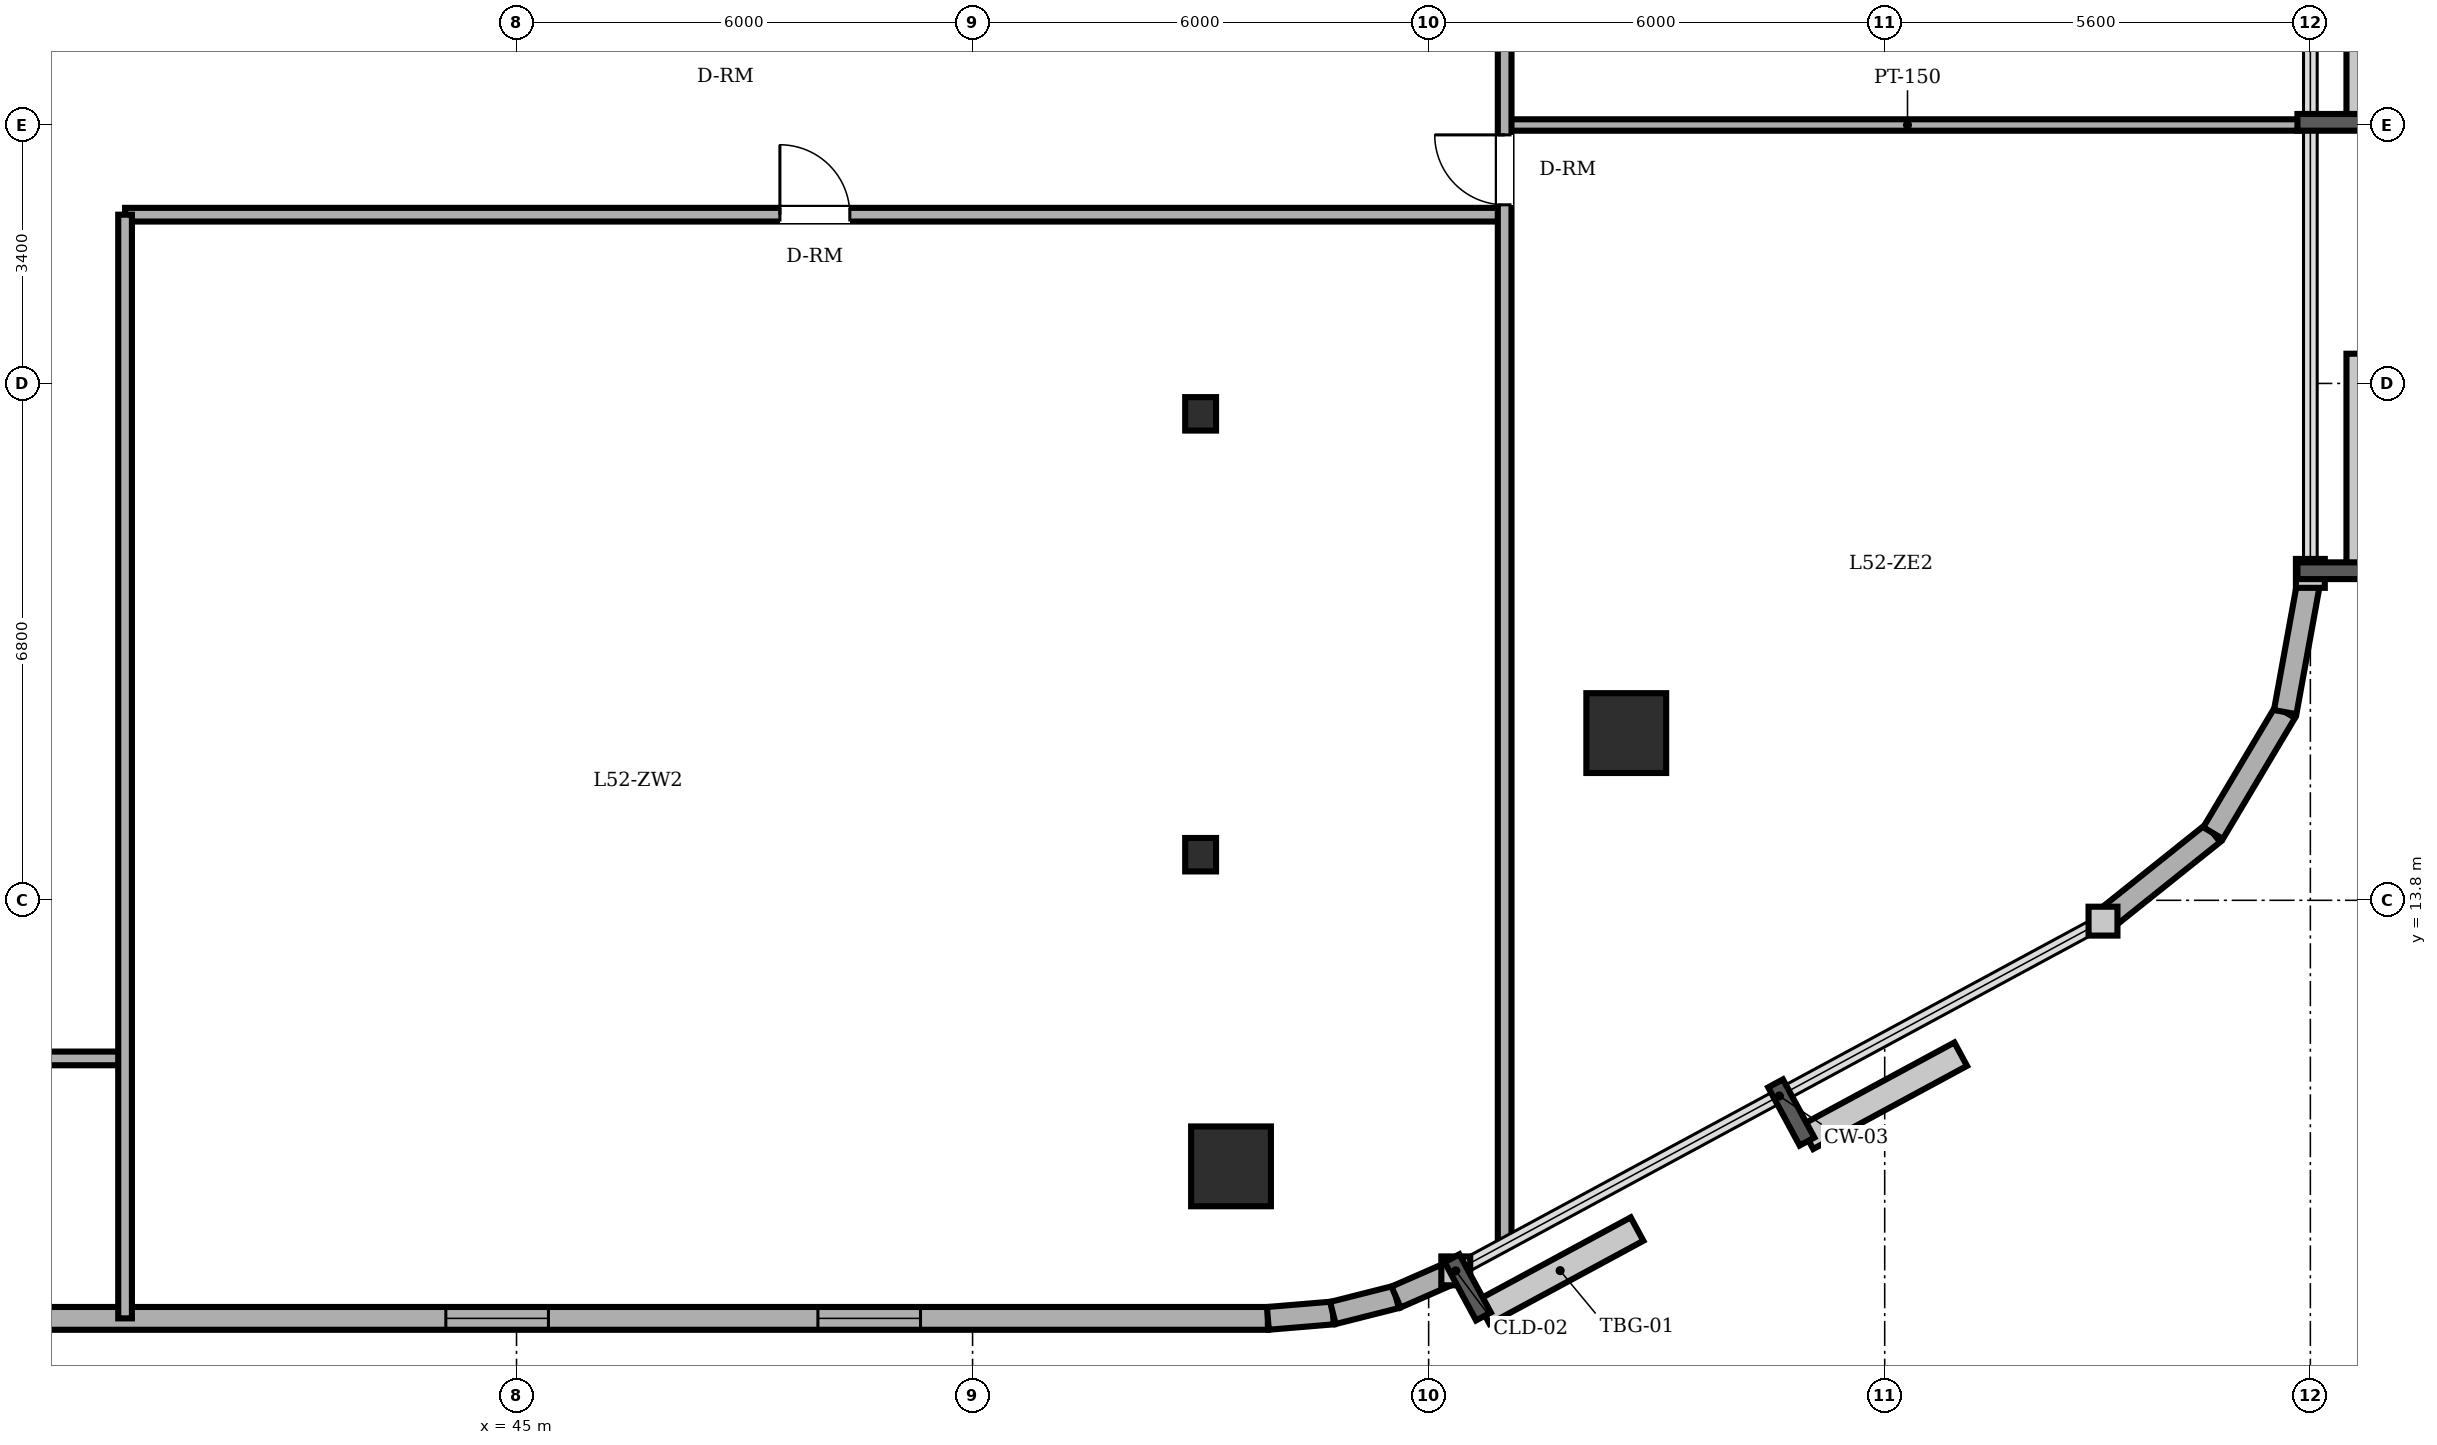
"""IFC4 building model, lengths in metres.
Left out: names, types, materials, properties, quantities, classifications, styles, units other than length and angle.
Written with IfcOpenShell. Run it as: python <this file> out.ifc"""

import sys

from ifc_helpers import new_model, si_unit, direction, frame, frame_2d, origin, origin_2d, place, context, subcontext, project, spatial, rectangle, circle, i_section, extrude, element, fill, save


model = new_model("IFC4")
c1 = context("Model", 3, precision=1e-05, world=origin(), true_north=direction((0.0, 1.0)))
c2 = subcontext(c1, "Body", "Model", "MODEL_VIEW")
j1 = project(units=[si_unit("LENGTHUNIT", "METRE"), si_unit("PLANEANGLEUNIT", "RADIAN")], contexts=[c1])
p1 = place(None, origin())
s1 = spatial("IfcSite", under=j1, at=p1, CompositionType="ELEMENT")
p2 = place(p1, origin())
s2 = spatial("IfcBuilding", under=s1, at=p2, CompositionType="ELEMENT")
p3 = place(p2, frame((0.0, 0.0, 201.3)))
s3 = spatial("IfcBuildingStorey", under=s2, at=p3, CompositionType="ELEMENT", Elevation=201.3)
for number, where, z_axis, x_axis in (
    (1, (54.4, 10.3, 0.0), (0.0, 0.0, 1.0), (1.0, 0.0, 0.0)),
    (2, (59.6, 16.0, 0.0), (0.0, 0.0, 1.0), (1.0, 0.0, 0.0)),
):
    element("IfcColumn", number, at=place(p3, frame(where, z_axis=z_axis, x_axis=x_axis)), inside=s3, PredefinedType="COLUMN", context=c2, shape_type="SweptSolid", body=[
        extrude(circle(Radius=0.525, at=origin_2d()), origin(), (0.0, 0.0, 1.0), 3.6),
    ])
for number, where, z_axis, x_axis in (
    (3, (54.0, 14.4, 0.0), (0.0, 0.0, 1.0), (1.0, 0.0, 0.0)),
    (4, (54.0, 20.2, 0.0), (0.0, 0.0, 1.0), (1.0, 0.0, 0.0)),
):
    element("IfcColumn", number, at=place(p3, frame(where, z_axis=z_axis, x_axis=x_axis)), inside=s3, PredefinedType="COLUMN", context=c2, shape_type="SweptSolid", body=[
        extrude(i_section(OverallWidth=0.406, OverallDepth=0.44, WebThickness=0.024, FlangeThickness=0.039, FilletRadius=0.015, at=origin_2d()), origin(), (0.0, 0.0, 1.0), 3.6),
    ])
p4 = place(p3, frame((22.4, 8.3, 0.0), z_axis=(0.0, 0.0, 1.0), x_axis=(1.0, 0.0, 0.0)))
e5 = element("IfcWall", 5, at=p4, inside=s3, PredefinedType="SOLIDWALL", context=c2, shape_type="SweptSolid", body=[
    extrude(rectangle(XDim=32.485, YDim=0.3, at=frame_2d((16.243, 0.0))), origin(), (0.0, 0.0, 1.0), 3.4),
])
p5 = place(p4, frame((9.737, 0.0, 0.0)))
e6 = element("IfcOpeningElement", 6, at=p5, cuts=e5, PredefinedType="OPENING", context=c2, shape_type="SweptSolid", body=[
    extrude(rectangle(XDim=0.95, YDim=2.2, at=frame_2d((0.475, 1.1))), frame((0.0, 0.16, 0.0), z_axis=(0.0, -1.0, 0.0), x_axis=(1.0, 0.0, 0.0)), (0.0, 0.0, 1.0), 0.32),
])
p6 = place(p4, frame((3.425, 0.0, 0.85)))
e7 = element("IfcOpeningElement", 7, at=p6, cuts=e5, PredefinedType="OPENING", context=c2, shape_type="SweptSolid", body=[
    extrude(rectangle(XDim=1.35, YDim=1.55, at=frame_2d((0.675, 0.775))), frame((0.0, 0.16, 0.0), z_axis=(0.0, -1.0, 0.0), x_axis=(1.0, 0.0, 0.0)), (0.0, 0.0, 1.0), 0.32),
])
p7 = place(p4, frame((12.958, 0.0, 0.85)))
e8 = element("IfcOpeningElement", 8, at=p7, cuts=e5, PredefinedType="OPENING", context=c2, shape_type="SweptSolid", body=[
    extrude(rectangle(XDim=1.35, YDim=1.55, at=frame_2d((0.675, 0.775))), frame((0.0, 0.16, 0.0), z_axis=(0.0, -1.0, 0.0), x_axis=(1.0, 0.0, 0.0)), (0.0, 0.0, 1.0), 0.32),
])
p8 = place(p4, frame((21.67, 0.0, 0.85)))
e9 = element("IfcOpeningElement", 9, at=p8, cuts=e5, PredefinedType="OPENING", context=c2, shape_type="SweptSolid", body=[
    extrude(rectangle(XDim=1.35, YDim=1.55, at=frame_2d((0.675, 0.775))), frame((0.0, 0.16, 0.0), z_axis=(0.0, -1.0, 0.0), x_axis=(1.0, 0.0, 0.0)), (0.0, 0.0, 1.0), 0.32),
])
p9 = place(p4, frame((26.565, 0.0, 0.85)))
e10 = element("IfcOpeningElement", 10, at=p9, cuts=e5, PredefinedType="OPENING", context=c2, shape_type="SweptSolid", body=[
    extrude(rectangle(XDim=1.35, YDim=1.55, at=frame_2d((0.675, 0.775))), frame((0.0, 0.16, 0.0), z_axis=(0.0, -1.0, 0.0), x_axis=(1.0, 0.0, 0.0)), (0.0, 0.0, 1.0), 0.32),
])
p10 = place(p3, frame((54.885, 8.3, 0.0), z_axis=(0.0, 0.0, 1.0), x_axis=(0.996565355958, 0.082809971041, 0.0)))
e11 = element("IfcWall", 11, at=p10, inside=s3, PredefinedType="SOLIDWALL", context=c2, shape_type="SweptSolid", body=[
    extrude(rectangle(XDim=0.858, YDim=0.3, at=frame_2d((0.429, 0.0))), origin(), (0.0, 0.0, 1.0), 3.4),
])
p11 = place(p3, frame((55.74, 8.371, 0.0), z_axis=(0.0, 0.0, 1.0), x_axis=(0.969536346338, 0.244947490555, 0.0)))
e12 = element("IfcWall", 12, at=p11, inside=s3, PredefinedType="SOLIDWALL", context=c2, shape_type="SweptSolid", body=[
    extrude(rectangle(XDim=0.857, YDim=0.3, at=frame_2d((0.429, 0.0))), origin(), (0.0, 0.0, 1.0), 3.4),
])
p12 = place(p3, frame((56.571, 8.581, 0.0), z_axis=(0.0, 0.0, 1.0), x_axis=(0.916085473636, 0.400983048261, 0.0)))
e13 = element("IfcWall", 13, at=p12, inside=s3, PredefinedType="SOLIDWALL", context=c2, shape_type="SweptSolid", body=[
    extrude(rectangle(XDim=0.858, YDim=0.3, at=frame_2d((0.429, 0.0))), origin(), (0.0, 0.0, 1.0), 3.4),
])
p13 = place(p3, frame((65.872, 13.526, 0.0), z_axis=(0.0, 0.0, 1.0), x_axis=(0.780920189257, 0.624630817372, 0.0)))
e14 = element("IfcWall", 14, at=p13, inside=s3, PredefinedType="SOLIDWALL", context=c2, shape_type="SweptSolid", body=[
    extrude(rectangle(XDim=1.854, YDim=0.3, at=frame_2d((0.927, 0.0))), origin(), (0.0, 0.0, 1.0), 3.4),
])
p14 = place(p3, frame((67.32, 14.684, 0.0), z_axis=(0.0, 0.0, 1.0), x_axis=(0.512072018927, 0.858942516955, 0.0)))
e15 = element("IfcWall", 15, at=p14, inside=s3, PredefinedType="SOLIDWALL", context=c2, shape_type="SweptSolid", body=[
    extrude(rectangle(XDim=1.853, YDim=0.3, at=frame_2d((0.927, 0.0))), origin(), (0.0, 0.0, 1.0), 3.4),
])
p15 = place(p3, frame((68.269, 16.276, 0.0), z_axis=(0.0, 0.0, 1.0), x_axis=(0.178468469252, 0.983945631365, 0.0)))
e16 = element("IfcWall", 16, at=p15, inside=s3, PredefinedType="SOLIDWALL", context=c2, shape_type="SweptSolid", body=[
    extrude(rectangle(XDim=1.855, YDim=0.3, at=frame_2d((0.927, 0.0))), origin(), (0.0, 0.0, 1.0), 3.4),
])
p16 = place(p3, frame((17.677, 11.72, 0.0), z_axis=(0.0, 0.0, 1.0), x_axis=(1.0, 0.0, 0.0)))
e17 = element("IfcWall", 17, at=p16, inside=s3, PredefinedType="PARTITIONING", context=c2, shape_type="SweptSolid", body=[
    extrude(rectangle(XDim=22.173, YDim=0.18, at=frame_2d((11.086, 0.0))), origin(), (0.0, 0.0, 1.0), 3.4),
])
p17 = place(p16, frame((8.363, 0.0, 0.0)))
e18 = element("IfcOpeningElement", 18, at=p17, cuts=e17, PredefinedType="OPENING", context=c2, shape_type="SweptSolid", body=[
    extrude(rectangle(XDim=0.92, YDim=2.1, at=frame_2d((0.46, 1.05))), frame((0.0, 0.1, 0.0), z_axis=(0.0, -1.0, 0.0), x_axis=(1.0, 0.0, 0.0)), (0.0, 0.0, 1.0), 0.2),
])
p18 = place(p16, frame((4.479, 0.0, 0.0)))
e19 = element("IfcOpeningElement", 19, at=p18, cuts=e17, PredefinedType="OPENING", context=c2, shape_type="SweptSolid", body=[
    extrude(rectangle(XDim=0.92, YDim=2.1, at=frame_2d((0.46, 1.05))), frame((0.0, 0.1, 0.0), z_axis=(0.0, -1.0, 0.0), x_axis=(1.0, 0.0, 0.0)), (0.0, 0.0, 1.0), 0.2),
])
p19 = place(p16, frame((15.728, 0.0, 0.0)))
e20 = element("IfcOpeningElement", 20, at=p19, cuts=e17, PredefinedType="OPENING", context=c2, shape_type="SweptSolid", body=[
    extrude(rectangle(XDim=0.92, YDim=2.1, at=frame_2d((0.46, 1.05))), frame((0.0, 0.1, 0.0), z_axis=(0.0, -1.0, 0.0), x_axis=(1.0, 0.0, 0.0)), (0.0, 0.0, 1.0), 0.2),
])
p20 = place(p3, frame((39.85, 22.82, 0.0), z_axis=(0.0, 0.0, 1.0), x_axis=(1.0, 0.0, 0.0)))
e21 = element("IfcWall", 21, at=p20, inside=s3, PredefinedType="PARTITIONING", context=c2, shape_type="SweptSolid", body=[
    extrude(rectangle(XDim=18.15, YDim=0.18, at=frame_2d((9.075, 0.0))), origin(), (0.0, 0.0, 1.0), 3.4),
])
p21 = place(p20, frame((8.615, 0.0, 0.0)))
e22 = element("IfcOpeningElement", 22, at=p21, cuts=e21, PredefinedType="OPENING", context=c2, shape_type="SweptSolid", body=[
    extrude(rectangle(XDim=0.92, YDim=2.1, at=frame_2d((0.46, 1.05))), frame((0.0, 0.1, 0.0), z_axis=(0.0, -1.0, 0.0), x_axis=(1.0, 0.0, 0.0)), (0.0, 0.0, 1.0), 0.2),
])
p22 = place(p3, frame((58.0, 24.0, 0.0), z_axis=(0.0, 0.0, 1.0), x_axis=(1.0, 0.0, 0.0)))
e23 = element("IfcWall", 23, at=p22, inside=s3, PredefinedType="PARTITIONING", context=c2, shape_type="SweptSolid", body=[
    extrude(rectangle(XDim=10.6, YDim=0.15, at=frame_2d((5.3, 0.0))), origin(), (0.0, 0.0, 1.0), 3.022),
])
p23 = place(p3, frame((39.85, 8.3, 0.0), z_axis=(0.0, 0.0, 1.0), x_axis=(0.0, 1.0, 0.0)))
e24 = element("IfcWall", 24, at=p23, inside=s3, PredefinedType="PARTITIONING", context=c2, shape_type="SweptSolid", body=[
    extrude(rectangle(XDim=14.52, YDim=0.18, at=frame_2d((7.26, 0.0))), origin(), (0.0, 0.0, 1.0), 3.4),
])
p24 = place(p3, frame((58.0, 9.272, 0.0), z_axis=(0.0, 0.0, 1.0), x_axis=(0.0, 1.0, 0.0)))
e25 = element("IfcWall", 25, at=p24, inside=s3, PredefinedType="PARTITIONING", context=c2, shape_type="SweptSolid", body=[
    extrude(rectangle(XDim=21.078, YDim=0.18, at=frame_2d((10.539, 0.0))), origin(), (0.0, 0.0, 1.0), 3.4),
])
p25 = place(p24, frame((17.143, 0.0, 0.0)))
e26 = element("IfcOpeningElement", 26, at=p25, cuts=e25, PredefinedType="OPENING", context=c2, shape_type="SweptSolid", body=[
    extrude(rectangle(XDim=1.0, YDim=2.15, at=frame_2d((0.5, 1.075))), frame((0.0, 0.1, 0.0), z_axis=(0.0, -1.0, 0.0), x_axis=(1.0, 0.0, 0.0)), (0.0, 0.0, 1.0), 0.2),
])
p26 = place(p24, frame((13.678, 0.0, 0.0)))
e27 = element("IfcOpeningElement", 27, at=p26, cuts=e25, PredefinedType="OPENING", context=c2, shape_type="SweptSolid", body=[
    extrude(rectangle(XDim=0.92, YDim=2.1, at=frame_2d((0.46, 1.05))), frame((0.0, 0.1, 0.0), z_axis=(0.0, -1.0, 0.0), x_axis=(1.0, 0.0, 0.0)), (0.0, 0.0, 1.0), 0.2),
])
p27 = place(p8, origin())
e28 = element("IfcWindow", 28, at=p27, inside=s3, PartitioningType="SINGLE_PANEL", PredefinedType="WINDOW", context=c2, shape_type="SweptSolid", body=[
    extrude(rectangle(XDim=1.35, YDim=1.55, at=frame_2d((0.675, 0.775))), frame((0.0, 0.03, 0.0), z_axis=(0.0, -1.0, 0.0), x_axis=(1.0, 0.0, 0.0)), (0.0, 0.0, 1.0), 0.06),
])
fill(e9, e28)
p28 = place(p9, origin())
e29 = element("IfcWindow", 29, at=p28, inside=s3, PartitioningType="SINGLE_PANEL", PredefinedType="WINDOW", context=c2, shape_type="SweptSolid", body=[
    extrude(rectangle(XDim=1.35, YDim=1.55, at=frame_2d((0.675, 0.775))), frame((0.0, 0.03, 0.0), z_axis=(0.0, -1.0, 0.0), x_axis=(1.0, 0.0, 0.0)), (0.0, 0.0, 1.0), 0.06),
])
fill(e10, e29)
p29 = place(p21, origin())
e30 = element("IfcDoor", 30, at=p29, inside=s3, OperationType="SINGLE_SWING_LEFT", PredefinedType="DOOR", context=c2, shape_type="SweptSolid", body=[
    extrude(rectangle(XDim=0.92, YDim=2.1, at=frame_2d((0.46, 1.05))), frame((0.0, 0.025, 0.0), z_axis=(0.0, -1.0, 0.0), x_axis=(1.0, 0.0, 0.0)), (0.0, 0.0, 1.0), 0.05),
])
fill(e22, e30)
p30 = place(p26, origin())
e31 = element("IfcDoor", 31, at=p30, inside=s3, OperationType="SINGLE_SWING_RIGHT", PredefinedType="DOOR", context=c2, shape_type="SweptSolid", body=[
    extrude(rectangle(XDim=0.92, YDim=2.1, at=frame_2d((0.46, 1.05))), frame((0.0, 0.025, 0.0), z_axis=(0.0, -1.0, 0.0), x_axis=(1.0, 0.0, 0.0)), (0.0, 0.0, 1.0), 0.05),
])
fill(e27, e31)
save(model, sys.argv[1])
